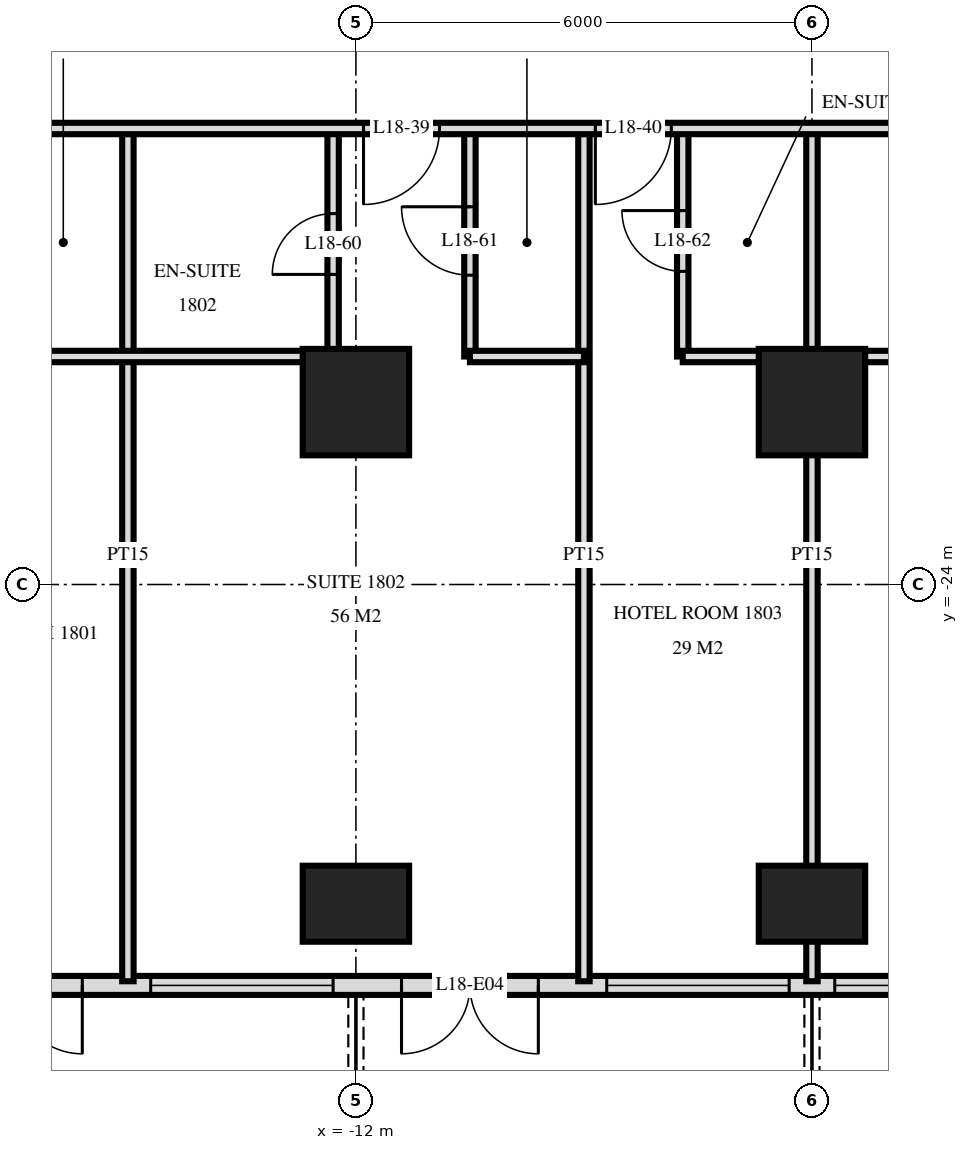
"""IFC4 building model, lengths in metres.
Left out: names, types, materials, properties, quantities, classifications, styles, units other than length and angle.
Written with IfcOpenShell. Run it as: python <this file> out.ifc"""

import sys

from ifc_helpers import new_model, si_unit, direction, frame, frame_2d, origin, origin_2d, place, context, subcontext, project, spatial, rectangle, extrude, element, fill, save


model = new_model("IFC4")
c1 = context("Model", 3, precision=1e-05, world=origin(), true_north=direction((0.0, 1.0)))
c2 = subcontext(c1, "Body", "Model", "MODEL_VIEW")
j1 = project(units=[si_unit("LENGTHUNIT", "METRE"), si_unit("PLANEANGLEUNIT", "RADIAN")], contexts=[c1])
p1 = place(None, origin())
s1 = spatial("IfcSite", under=j1, at=p1, CompositionType="ELEMENT")
p2 = place(p1, origin())
s2 = spatial("IfcBuilding", under=s1, at=p2, CompositionType="ELEMENT")
p3 = place(p2, frame((0.0, 0.0, 74.4)))
s3 = spatial("IfcBuildingStorey", under=s2, at=p3, CompositionType="ELEMENT", Elevation=74.4)
p4 = place(p3, frame((-12.0, -28.2, 0.0), z_axis=(0.0, 0.0, 1.0), x_axis=(1.0, 0.0, 0.0)))
e1 = element("IfcColumn", 1, at=p4, inside=s3, PredefinedType="COLUMN", context=c2, shape_type="SweptSolid", body=[
    extrude(rectangle(XDim=1.4, YDim=1.0, at=origin_2d()), origin(), (0.0, 0.0, 1.0), 3.6),
])
p5 = place(p3, frame((-12.0, -21.6, 0.0), z_axis=(0.0, 0.0, 1.0), x_axis=(1.0, 0.0, 0.0)))
e2 = element("IfcColumn", 2, at=p5, inside=s3, PredefinedType="COLUMN", context=c2, shape_type="SweptSolid", body=[
    extrude(rectangle(XDim=1.4, YDim=1.4, at=origin_2d()), origin(), (0.0, 0.0, 1.0), 3.6),
])
p6 = place(p3, frame((-6.0, -28.2, 0.0), z_axis=(0.0, 0.0, 1.0), x_axis=(1.0, 0.0, 0.0)))
e3 = element("IfcColumn", 3, at=p6, inside=s3, PredefinedType="COLUMN", context=c2, shape_type="SweptSolid", body=[
    extrude(rectangle(XDim=1.4, YDim=1.0, at=origin_2d()), origin(), (0.0, 0.0, 1.0), 3.6),
])
p7 = place(p3, frame((-6.0, -21.6, 0.0), z_axis=(0.0, 0.0, 1.0), x_axis=(1.0, 0.0, 0.0)))
e4 = element("IfcColumn", 4, at=p7, inside=s3, PredefinedType="COLUMN", context=c2, shape_type="SweptSolid", body=[
    extrude(rectangle(XDim=1.4, YDim=1.4, at=origin_2d()), origin(), (0.0, 0.0, 1.0), 3.6),
])
p8 = place(p3, frame((-28.775, -29.275, 0.0), z_axis=(0.0, 0.0, 1.0), x_axis=(1.0, 0.0, 0.0)))
e5 = element("IfcWall", 5, at=p8, inside=s3, PredefinedType="SOLIDWALL", context=c2, shape_type="SweptSolid", body=[
    extrude(rectangle(XDim=57.551, YDim=0.25, at=frame_2d((28.775, 0.0))), origin(), (0.0, 0.0, 1.0), 3.32),
])
p9 = place(p8, frame((0.575, 0.0, 0.0)))
e6 = element("IfcOpeningElement", 6, at=p9, cuts=e5, PredefinedType="OPENING", context=c2, shape_type="SweptSolid", body=[
    extrude(rectangle(XDim=1.8, YDim=2.4, at=frame_2d((0.9, 1.2))), frame((0.0, 0.135, 0.0), z_axis=(0.0, -1.0, 0.0), x_axis=(1.0, 0.0, 0.0)), (0.0, 0.0, 1.0), 0.27),
])
p10 = place(p8, frame((5.075, 0.0, 0.3)))
e7 = element("IfcOpeningElement", 7, at=p10, cuts=e5, PredefinedType="OPENING", context=c2, shape_type="SweptSolid", body=[
    extrude(rectangle(XDim=2.4, YDim=2.1, at=frame_2d((1.2, 1.05))), frame((0.0, 0.135, 0.0), z_axis=(0.0, -1.0, 0.0), x_axis=(1.0, 0.0, 0.0)), (0.0, 0.0, 1.0), 0.27),
])
p11 = place(p8, frame((8.375, 0.0, 0.0)))
e8 = element("IfcOpeningElement", 8, at=p11, cuts=e5, PredefinedType="OPENING", context=c2, shape_type="SweptSolid", body=[
    extrude(rectangle(XDim=1.8, YDim=2.4, at=frame_2d((0.9, 1.2))), frame((0.0, 0.135, 0.0), z_axis=(0.0, -1.0, 0.0), x_axis=(1.0, 0.0, 0.0)), (0.0, 0.0, 1.0), 0.27),
])
p12 = place(p8, frame((11.375, 0.0, 0.0)))
e9 = element("IfcOpeningElement", 9, at=p12, cuts=e5, PredefinedType="OPENING", context=c2, shape_type="SweptSolid", body=[
    extrude(rectangle(XDim=1.8, YDim=2.4, at=frame_2d((0.9, 1.2))), frame((0.0, 0.135, 0.0), z_axis=(0.0, -1.0, 0.0), x_axis=(1.0, 0.0, 0.0)), (0.0, 0.0, 1.0), 0.27),
])
p13 = place(p8, frame((14.075, 0.0, 0.3)))
e10 = element("IfcOpeningElement", 10, at=p13, cuts=e5, PredefinedType="OPENING", context=c2, shape_type="SweptSolid", body=[
    extrude(rectangle(XDim=2.4, YDim=2.1, at=frame_2d((1.2, 1.05))), frame((0.0, 0.135, 0.0), z_axis=(0.0, -1.0, 0.0), x_axis=(1.0, 0.0, 0.0)), (0.0, 0.0, 1.0), 0.27),
])
p14 = place(p8, frame((17.375, 0.0, 0.0)))
e11 = element("IfcOpeningElement", 11, at=p14, cuts=e5, PredefinedType="OPENING", context=c2, shape_type="SweptSolid", body=[
    extrude(rectangle(XDim=1.8, YDim=2.4, at=frame_2d((0.9, 1.2))), frame((0.0, 0.135, 0.0), z_axis=(0.0, -1.0, 0.0), x_axis=(1.0, 0.0, 0.0)), (0.0, 0.0, 1.0), 0.27),
])
p15 = place(p8, frame((20.075, 0.0, 0.3)))
e12 = element("IfcOpeningElement", 12, at=p15, cuts=e5, PredefinedType="OPENING", context=c2, shape_type="SweptSolid", body=[
    extrude(rectangle(XDim=2.4, YDim=2.1, at=frame_2d((1.2, 1.05))), frame((0.0, 0.135, 0.0), z_axis=(0.0, -1.0, 0.0), x_axis=(1.0, 0.0, 0.0)), (0.0, 0.0, 1.0), 0.27),
])
p16 = place(p8, frame((23.075, 0.0, 0.3)))
e13 = element("IfcOpeningElement", 13, at=p16, cuts=e5, PredefinedType="OPENING", context=c2, shape_type="SweptSolid", body=[
    extrude(rectangle(XDim=2.4, YDim=2.1, at=frame_2d((1.2, 1.05))), frame((0.0, 0.135, 0.0), z_axis=(0.0, -1.0, 0.0), x_axis=(1.0, 0.0, 0.0)), (0.0, 0.0, 1.0), 0.27),
])
p17 = place(p8, frame((26.375, 0.0, 0.0)))
e14 = element("IfcOpeningElement", 14, at=p17, cuts=e5, PredefinedType="OPENING", context=c2, shape_type="SweptSolid", body=[
    extrude(rectangle(XDim=1.8, YDim=2.4, at=frame_2d((0.9, 1.2))), frame((0.0, 0.135, 0.0), z_axis=(0.0, -1.0, 0.0), x_axis=(1.0, 0.0, 0.0)), (0.0, 0.0, 1.0), 0.27),
])
p18 = place(p8, frame((29.375, 0.0, 0.0)))
e15 = element("IfcOpeningElement", 15, at=p18, cuts=e5, PredefinedType="OPENING", context=c2, shape_type="SweptSolid", body=[
    extrude(rectangle(XDim=1.8, YDim=2.4, at=frame_2d((0.9, 1.2))), frame((0.0, 0.135, 0.0), z_axis=(0.0, -1.0, 0.0), x_axis=(1.0, 0.0, 0.0)), (0.0, 0.0, 1.0), 0.27),
])
p19 = place(p8, frame((32.075, 0.0, 0.3)))
e16 = element("IfcOpeningElement", 16, at=p19, cuts=e5, PredefinedType="OPENING", context=c2, shape_type="SweptSolid", body=[
    extrude(rectangle(XDim=2.4, YDim=2.1, at=frame_2d((1.2, 1.05))), frame((0.0, 0.135, 0.0), z_axis=(0.0, -1.0, 0.0), x_axis=(1.0, 0.0, 0.0)), (0.0, 0.0, 1.0), 0.27),
])
p20 = place(p8, frame((35.375, 0.0, 0.0)))
e17 = element("IfcOpeningElement", 17, at=p20, cuts=e5, PredefinedType="OPENING", context=c2, shape_type="SweptSolid", body=[
    extrude(rectangle(XDim=1.8, YDim=2.4, at=frame_2d((0.9, 1.2))), frame((0.0, 0.135, 0.0), z_axis=(0.0, -1.0, 0.0), x_axis=(1.0, 0.0, 0.0)), (0.0, 0.0, 1.0), 0.27),
])
p21 = place(p8, frame((38.075, 0.0, 0.3)))
e18 = element("IfcOpeningElement", 18, at=p21, cuts=e5, PredefinedType="OPENING", context=c2, shape_type="SweptSolid", body=[
    extrude(rectangle(XDim=2.4, YDim=2.1, at=frame_2d((1.2, 1.05))), frame((0.0, 0.135, 0.0), z_axis=(0.0, -1.0, 0.0), x_axis=(1.0, 0.0, 0.0)), (0.0, 0.0, 1.0), 0.27),
])
p22 = place(p8, frame((41.075, 0.0, 0.3)))
e19 = element("IfcOpeningElement", 19, at=p22, cuts=e5, PredefinedType="OPENING", context=c2, shape_type="SweptSolid", body=[
    extrude(rectangle(XDim=2.4, YDim=2.1, at=frame_2d((1.2, 1.05))), frame((0.0, 0.135, 0.0), z_axis=(0.0, -1.0, 0.0), x_axis=(1.0, 0.0, 0.0)), (0.0, 0.0, 1.0), 0.27),
])
p23 = place(p8, frame((44.375, 0.0, 0.0)))
e20 = element("IfcOpeningElement", 20, at=p23, cuts=e5, PredefinedType="OPENING", context=c2, shape_type="SweptSolid", body=[
    extrude(rectangle(XDim=1.8, YDim=2.4, at=frame_2d((0.9, 1.2))), frame((0.0, 0.135, 0.0), z_axis=(0.0, -1.0, 0.0), x_axis=(1.0, 0.0, 0.0)), (0.0, 0.0, 1.0), 0.27),
])
p24 = place(p8, frame((47.075, 0.0, 0.3)))
e21 = element("IfcOpeningElement", 21, at=p24, cuts=e5, PredefinedType="OPENING", context=c2, shape_type="SweptSolid", body=[
    extrude(rectangle(XDim=2.4, YDim=2.1, at=frame_2d((1.2, 1.05))), frame((0.0, 0.135, 0.0), z_axis=(0.0, -1.0, 0.0), x_axis=(1.0, 0.0, 0.0)), (0.0, 0.0, 1.0), 0.27),
])
p25 = place(p8, frame((50.375, 0.0, 0.0)))
e22 = element("IfcOpeningElement", 22, at=p25, cuts=e5, PredefinedType="OPENING", context=c2, shape_type="SweptSolid", body=[
    extrude(rectangle(XDim=1.8, YDim=2.4, at=frame_2d((0.9, 1.2))), frame((0.0, 0.135, 0.0), z_axis=(0.0, -1.0, 0.0), x_axis=(1.0, 0.0, 0.0)), (0.0, 0.0, 1.0), 0.27),
])
p26 = place(p8, frame((53.375, 0.0, 0.0)))
e23 = element("IfcOpeningElement", 23, at=p26, cuts=e5, PredefinedType="OPENING", context=c2, shape_type="SweptSolid", body=[
    extrude(rectangle(XDim=1.8, YDim=2.4, at=frame_2d((0.9, 1.2))), frame((0.0, 0.135, 0.0), z_axis=(0.0, -1.0, 0.0), x_axis=(1.0, 0.0, 0.0)), (0.0, 0.0, 1.0), 0.27),
])
p27 = place(p3, frame((-6.0, -29.22, 0.0), z_axis=(0.0, 0.0, 1.0), x_axis=(0.0, 1.0, 0.0)))
e24 = element("IfcWall", 24, at=p27, inside=s3, PredefinedType="PARTITIONING", context=c2, shape_type="SweptSolid", body=[
    extrude(rectangle(XDim=11.22, YDim=0.15, at=frame_2d((5.61, 0.0))), origin(), (0.0, 0.0, 1.0), 3.32),
])
p28 = place(p3, frame((-7.7, -21.0, 0.0), z_axis=(0.0, 0.0, 1.0), x_axis=(0.0, 1.0, 0.0)))
e25 = element("IfcWall", 25, at=p28, inside=s3, PredefinedType="PARTITIONING", context=c2, shape_type="SweptSolid", body=[
    extrude(rectangle(XDim=3.0, YDim=0.15, at=frame_2d((1.5, 0.0))), origin(), (0.0, 0.0, 1.0), 3.32),
])
p29 = place(p28, frame((1.12, 0.0, 0.0)))
e26 = element("IfcOpeningElement", 26, at=p29, cuts=e25, PredefinedType="OPENING", context=c2, shape_type="SweptSolid", body=[
    extrude(rectangle(XDim=0.8, YDim=2.1, at=frame_2d((0.4, 1.05))), frame((0.0, 0.085, 0.0), z_axis=(0.0, -1.0, 0.0), x_axis=(1.0, 0.0, 0.0)), (0.0, 0.0, 1.0), 0.17),
])
p30 = place(p3, frame((-9.0, -29.22, 0.0), z_axis=(0.0, 0.0, 1.0), x_axis=(0.0, 1.0, 0.0)))
e27 = element("IfcWall", 27, at=p30, inside=s3, PredefinedType="PARTITIONING", context=c2, shape_type="SweptSolid", body=[
    extrude(rectangle(XDim=11.22, YDim=0.15, at=frame_2d((5.61, 0.0))), origin(), (0.0, 0.0, 1.0), 3.32),
])
p31 = place(p3, frame((-10.5, -21.0, 0.0), z_axis=(0.0, 0.0, 1.0), x_axis=(0.0, 1.0, 0.0)))
e28 = element("IfcWall", 28, at=p31, inside=s3, PredefinedType="PARTITIONING", context=c2, shape_type="SweptSolid", body=[
    extrude(rectangle(XDim=3.0, YDim=0.15, at=frame_2d((1.5, 0.0))), origin(), (0.0, 0.0, 1.0), 3.32),
])
p32 = place(p31, frame((1.07, 0.0, 0.0)))
e29 = element("IfcOpeningElement", 29, at=p32, cuts=e28, PredefinedType="OPENING", context=c2, shape_type="SweptSolid", body=[
    extrude(rectangle(XDim=0.9, YDim=2.1, at=frame_2d((0.45, 1.05))), frame((0.0, 0.085, 0.0), z_axis=(0.0, -1.0, 0.0), x_axis=(1.0, 0.0, 0.0)), (0.0, 0.0, 1.0), 0.17),
])
p33 = place(p3, frame((-12.3, -21.0, 0.0), z_axis=(0.0, 0.0, 1.0), x_axis=(0.0, 1.0, 0.0)))
e30 = element("IfcWall", 30, at=p33, inside=s3, PredefinedType="PARTITIONING", context=c2, shape_type="SweptSolid", body=[
    extrude(rectangle(XDim=3.0, YDim=0.15, at=frame_2d((1.5, 0.0))), origin(), (0.0, 0.0, 1.0), 3.32),
])
p34 = place(p33, frame((1.08, 0.0, 0.0)))
e31 = element("IfcOpeningElement", 31, at=p34, cuts=e30, PredefinedType="OPENING", context=c2, shape_type="SweptSolid", body=[
    extrude(rectangle(XDim=0.8, YDim=2.1, at=frame_2d((0.4, 1.05))), frame((0.0, 0.085, 0.0), z_axis=(0.0, -1.0, 0.0), x_axis=(1.0, 0.0, 0.0)), (0.0, 0.0, 1.0), 0.17),
])
p35 = place(p3, frame((-15.0, -29.22, 0.0), z_axis=(0.0, 0.0, 1.0), x_axis=(0.0, 1.0, 0.0)))
e32 = element("IfcWall", 32, at=p35, inside=s3, PredefinedType="PARTITIONING", context=c2, shape_type="SweptSolid", body=[
    extrude(rectangle(XDim=11.22, YDim=0.15, at=frame_2d((5.61, 0.0))), origin(), (0.0, 0.0, 1.0), 3.32),
])
p36 = place(p3, frame((-16.7, -21.0, 0.0), z_axis=(0.0, 0.0, 1.0), x_axis=(1.0, 0.0, 0.0)))
e33 = element("IfcWall", 33, at=p36, inside=s3, PredefinedType="PARTITIONING", context=c2, shape_type="SweptSolid", body=[
    extrude(rectangle(XDim=4.4, YDim=0.15, at=frame_2d((2.2, 0.0))), origin(), (0.0, 0.0, 1.0), 3.32),
])
p37 = place(p3, frame((-10.5, -21.0, 0.0), z_axis=(0.0, 0.0, 1.0), x_axis=(1.0, 0.0, 0.0)))
e34 = element("IfcWall", 34, at=p37, inside=s3, PredefinedType="PARTITIONING", context=c2, shape_type="SweptSolid", body=[
    extrude(rectangle(XDim=1.5, YDim=0.15, at=frame_2d((0.75, 0.0))), origin(), (0.0, 0.0, 1.0), 3.32),
])
p38 = place(p3, frame((-7.7, -21.0, 0.0), z_axis=(0.0, 0.0, 1.0), x_axis=(1.0, 0.0, 0.0)))
e35 = element("IfcWall", 35, at=p38, inside=s3, PredefinedType="PARTITIONING", context=c2, shape_type="SweptSolid", body=[
    extrude(rectangle(XDim=4.4, YDim=0.15, at=frame_2d((2.2, 0.0))), origin(), (0.0, 0.0, 1.0), 3.32),
])
p39 = place(p3, frame((-33.12, -18.0, 0.0), z_axis=(0.0, 0.0, 1.0), x_axis=(1.0, 0.0, 0.0)))
e36 = element("IfcWall", 36, at=p39, inside=s3, PredefinedType="PARTITIONING", context=c2, shape_type="SweptSolid", body=[
    extrude(rectangle(XDim=66.24, YDim=0.15, at=frame_2d((33.12, 0.0))), origin(), (0.0, 0.0, 1.0), 3.32),
])
p40 = place(p39, frame((15.27, 0.0, 0.0)))
e37 = element("IfcOpeningElement", 37, at=p40, cuts=e36, PredefinedType="OPENING", context=c2, shape_type="SweptSolid", body=[
    extrude(rectangle(XDim=1.0, YDim=2.1, at=frame_2d((0.5, 1.05))), frame((0.0, 0.085, 0.0), z_axis=(0.0, -1.0, 0.0), x_axis=(1.0, 0.0, 0.0)), (0.0, 0.0, 1.0), 0.17),
])
p41 = place(p39, frame((21.22, 0.0, 0.0)))
e38 = element("IfcOpeningElement", 38, at=p41, cuts=e36, PredefinedType="OPENING", context=c2, shape_type="SweptSolid", body=[
    extrude(rectangle(XDim=1.0, YDim=2.1, at=frame_2d((0.5, 1.05))), frame((0.0, 0.085, 0.0), z_axis=(0.0, -1.0, 0.0), x_axis=(1.0, 0.0, 0.0)), (0.0, 0.0, 1.0), 0.17),
])
p42 = place(p39, frame((24.27, 0.0, 0.0)))
e39 = element("IfcOpeningElement", 39, at=p42, cuts=e36, PredefinedType="OPENING", context=c2, shape_type="SweptSolid", body=[
    extrude(rectangle(XDim=1.0, YDim=2.1, at=frame_2d((0.5, 1.05))), frame((0.0, 0.085, 0.0), z_axis=(0.0, -1.0, 0.0), x_axis=(1.0, 0.0, 0.0)), (0.0, 0.0, 1.0), 0.17),
])
p43 = place(p39, frame((30.97, 0.0, 0.0)))
e40 = element("IfcOpeningElement", 40, at=p43, cuts=e36, PredefinedType="OPENING", context=c2, shape_type="SweptSolid", body=[
    extrude(rectangle(XDim=1.0, YDim=2.1, at=frame_2d((0.5, 1.05))), frame((0.0, 0.085, 0.0), z_axis=(0.0, -1.0, 0.0), x_axis=(1.0, 0.0, 0.0)), (0.0, 0.0, 1.0), 0.17),
])
p44 = place(p39, frame((40.42, 0.0, 0.0)))
e41 = element("IfcOpeningElement", 41, at=p44, cuts=e36, PredefinedType="OPENING", context=c2, shape_type="SweptSolid", body=[
    extrude(rectangle(XDim=1.0, YDim=2.1, at=frame_2d((0.5, 1.05))), frame((0.0, 0.085, 0.0), z_axis=(0.0, -1.0, 0.0), x_axis=(1.0, 0.0, 0.0)), (0.0, 0.0, 1.0), 0.17),
])
p45 = place(p39, frame((43.97, 0.0, 0.0)))
e42 = element("IfcOpeningElement", 42, at=p45, cuts=e36, PredefinedType="OPENING", context=c2, shape_type="SweptSolid", body=[
    extrude(rectangle(XDim=1.0, YDim=2.1, at=frame_2d((0.5, 1.05))), frame((0.0, 0.085, 0.0), z_axis=(0.0, -1.0, 0.0), x_axis=(1.0, 0.0, 0.0)), (0.0, 0.0, 1.0), 0.17),
])
p46 = place(p39, frame((45.52, 0.0, 0.0)))
e43 = element("IfcOpeningElement", 43, at=p46, cuts=e36, PredefinedType="OPENING", context=c2, shape_type="SweptSolid", body=[
    extrude(rectangle(XDim=1.0, YDim=2.1, at=frame_2d((0.5, 1.05))), frame((0.0, 0.085, 0.0), z_axis=(0.0, -1.0, 0.0), x_axis=(1.0, 0.0, 0.0)), (0.0, 0.0, 1.0), 0.17),
])
p47 = place(p39, frame((52.97, 0.0, 0.0)))
e44 = element("IfcOpeningElement", 44, at=p47, cuts=e36, PredefinedType="OPENING", context=c2, shape_type="SweptSolid", body=[
    extrude(rectangle(XDim=1.0, YDim=2.1, at=frame_2d((0.5, 1.05))), frame((0.0, 0.085, 0.0), z_axis=(0.0, -1.0, 0.0), x_axis=(1.0, 0.0, 0.0)), (0.0, 0.0, 1.0), 0.17),
])
p48 = place(p39, frame((54.27, 0.0, 0.0)))
e45 = element("IfcOpeningElement", 45, at=p48, cuts=e36, PredefinedType="OPENING", context=c2, shape_type="SweptSolid", body=[
    extrude(rectangle(XDim=1.0, YDim=2.1, at=frame_2d((0.5, 1.05))), frame((0.0, 0.085, 0.0), z_axis=(0.0, -1.0, 0.0), x_axis=(1.0, 0.0, 0.0)), (0.0, 0.0, 1.0), 0.17),
])
p49 = place(p39, frame((13.42, 0.0, 0.0)))
e46 = element("IfcOpeningElement", 46, at=p49, cuts=e36, PredefinedType="OPENING", context=c2, shape_type="SweptSolid", body=[
    extrude(rectangle(XDim=1.0, YDim=2.1, at=frame_2d((0.5, 1.05))), frame((0.0, 0.085, 0.0), z_axis=(0.0, -1.0, 0.0), x_axis=(1.0, 0.0, 0.0)), (0.0, 0.0, 1.0), 0.17),
])
p50 = place(p39, frame((60.82, 0.0, 0.0)))
e47 = element("IfcOpeningElement", 47, at=p50, cuts=e36, PredefinedType="OPENING", context=c2, shape_type="SweptSolid", body=[
    extrude(rectangle(XDim=1.0, YDim=2.1, at=frame_2d((0.5, 1.05))), frame((0.0, 0.085, 0.0), z_axis=(0.0, -1.0, 0.0), x_axis=(1.0, 0.0, 0.0)), (0.0, 0.0, 1.0), 0.17),
])
p51 = place(p12, frame((0.9, 0.0, 0.0), z_axis=(0.0, 0.0, 1.0), x_axis=(-1.0, 0.0, 0.0)))
e48 = element("IfcDoor", 48, at=p51, inside=s3, OperationType="DOUBLE_DOOR_SINGLE_SWING", PredefinedType="DOOR", context=c2, shape_type="SweptSolid", body=[
    extrude(rectangle(XDim=1.8, YDim=2.4, at=frame_2d((0.0, 1.2))), frame((0.0, -0.025, 0.0), z_axis=(0.0, 1.0, 0.0), x_axis=(-1.0, 0.0, 0.0)), (0.0, 0.0, 1.0), 0.05),
])
fill(e9, e48)
p52 = place(p13, origin())
e49 = element("IfcWindow", 49, at=p52, inside=s3, PartitioningType="SINGLE_PANEL", PredefinedType="WINDOW", context=c2, shape_type="SweptSolid", body=[
    extrude(rectangle(XDim=2.4, YDim=2.1, at=frame_2d((1.2, 1.05))), frame((0.0, 0.03, 0.0), z_axis=(0.0, -1.0, 0.0), x_axis=(1.0, 0.0, 0.0)), (0.0, 0.0, 1.0), 0.06),
])
fill(e10, e49)
p53 = place(p14, frame((0.9, 0.0, 0.0), z_axis=(0.0, 0.0, 1.0), x_axis=(-1.0, 0.0, 0.0)))
e50 = element("IfcDoor", 50, at=p53, inside=s3, OperationType="DOUBLE_DOOR_SINGLE_SWING", PredefinedType="DOOR", context=c2, shape_type="SweptSolid", body=[
    extrude(rectangle(XDim=1.8, YDim=2.4, at=frame_2d((0.0, 1.2))), frame((0.0, -0.025, 0.0), z_axis=(0.0, 1.0, 0.0), x_axis=(-1.0, 0.0, 0.0)), (0.0, 0.0, 1.0), 0.05),
])
fill(e11, e50)
p54 = place(p15, origin())
e51 = element("IfcWindow", 51, at=p54, inside=s3, PartitioningType="SINGLE_PANEL", PredefinedType="WINDOW", context=c2, shape_type="SweptSolid", body=[
    extrude(rectangle(XDim=2.4, YDim=2.1, at=frame_2d((1.2, 1.05))), frame((0.0, 0.03, 0.0), z_axis=(0.0, -1.0, 0.0), x_axis=(1.0, 0.0, 0.0)), (0.0, 0.0, 1.0), 0.06),
])
fill(e12, e51)
p55 = place(p16, origin())
e52 = element("IfcWindow", 52, at=p55, inside=s3, PartitioningType="SINGLE_PANEL", PredefinedType="WINDOW", context=c2, shape_type="SweptSolid", body=[
    extrude(rectangle(XDim=2.4, YDim=2.1, at=frame_2d((1.2, 1.05))), frame((0.0, 0.03, 0.0), z_axis=(0.0, -1.0, 0.0), x_axis=(1.0, 0.0, 0.0)), (0.0, 0.0, 1.0), 0.06),
])
fill(e13, e52)
p56 = place(p41, frame((0.5, 0.0, 0.0), z_axis=(0.0, 0.0, 1.0), x_axis=(-1.0, 0.0, 0.0)))
e53 = element("IfcDoor", 53, at=p56, inside=s3, OperationType="SINGLE_SWING_LEFT", PredefinedType="DOOR", context=c2, shape_type="SweptSolid", body=[
    extrude(rectangle(XDim=1.0, YDim=2.1, at=frame_2d((0.0, 1.05))), frame((0.0, -0.025, 0.0), z_axis=(0.0, 1.0, 0.0), x_axis=(-1.0, 0.0, 0.0)), (0.0, 0.0, 1.0), 0.05),
])
fill(e38, e53)
p57 = place(p42, frame((0.5, 0.0, 0.0), z_axis=(0.0, 0.0, 1.0), x_axis=(-1.0, 0.0, 0.0)))
e54 = element("IfcDoor", 54, at=p57, inside=s3, OperationType="SINGLE_SWING_LEFT", PredefinedType="DOOR", context=c2, shape_type="SweptSolid", body=[
    extrude(rectangle(XDim=1.0, YDim=2.1, at=frame_2d((0.0, 1.05))), frame((0.0, -0.025, 0.0), z_axis=(0.0, 1.0, 0.0), x_axis=(-1.0, 0.0, 0.0)), (0.0, 0.0, 1.0), 0.05),
])
fill(e39, e54)
p58 = place(p34, origin())
e55 = element("IfcDoor", 55, at=p58, inside=s3, OperationType="SINGLE_SWING_RIGHT", PredefinedType="DOOR", context=c2, shape_type="SweptSolid", body=[
    extrude(rectangle(XDim=0.8, YDim=2.1, at=frame_2d((0.4, 1.05))), frame((0.0, 0.025, 0.0), z_axis=(0.0, -1.0, 0.0), x_axis=(1.0, 0.0, 0.0)), (0.0, 0.0, 1.0), 0.05),
])
fill(e31, e55)
p59 = place(p32, origin())
e56 = element("IfcDoor", 56, at=p59, inside=s3, OperationType="SINGLE_SWING_LEFT", PredefinedType="DOOR", context=c2, shape_type="SweptSolid", body=[
    extrude(rectangle(XDim=0.9, YDim=2.1, at=frame_2d((0.45, 1.05))), frame((0.0, 0.025, 0.0), z_axis=(0.0, -1.0, 0.0), x_axis=(1.0, 0.0, 0.0)), (0.0, 0.0, 1.0), 0.05),
])
fill(e29, e56)
p60 = place(p29, origin())
e57 = element("IfcDoor", 57, at=p60, inside=s3, OperationType="SINGLE_SWING_LEFT", PredefinedType="DOOR", context=c2, shape_type="SweptSolid", body=[
    extrude(rectangle(XDim=0.8, YDim=2.1, at=frame_2d((0.4, 1.05))), frame((0.0, 0.025, 0.0), z_axis=(0.0, -1.0, 0.0), x_axis=(1.0, 0.0, 0.0)), (0.0, 0.0, 1.0), 0.05),
])
fill(e26, e57)
save(model, sys.argv[1])
